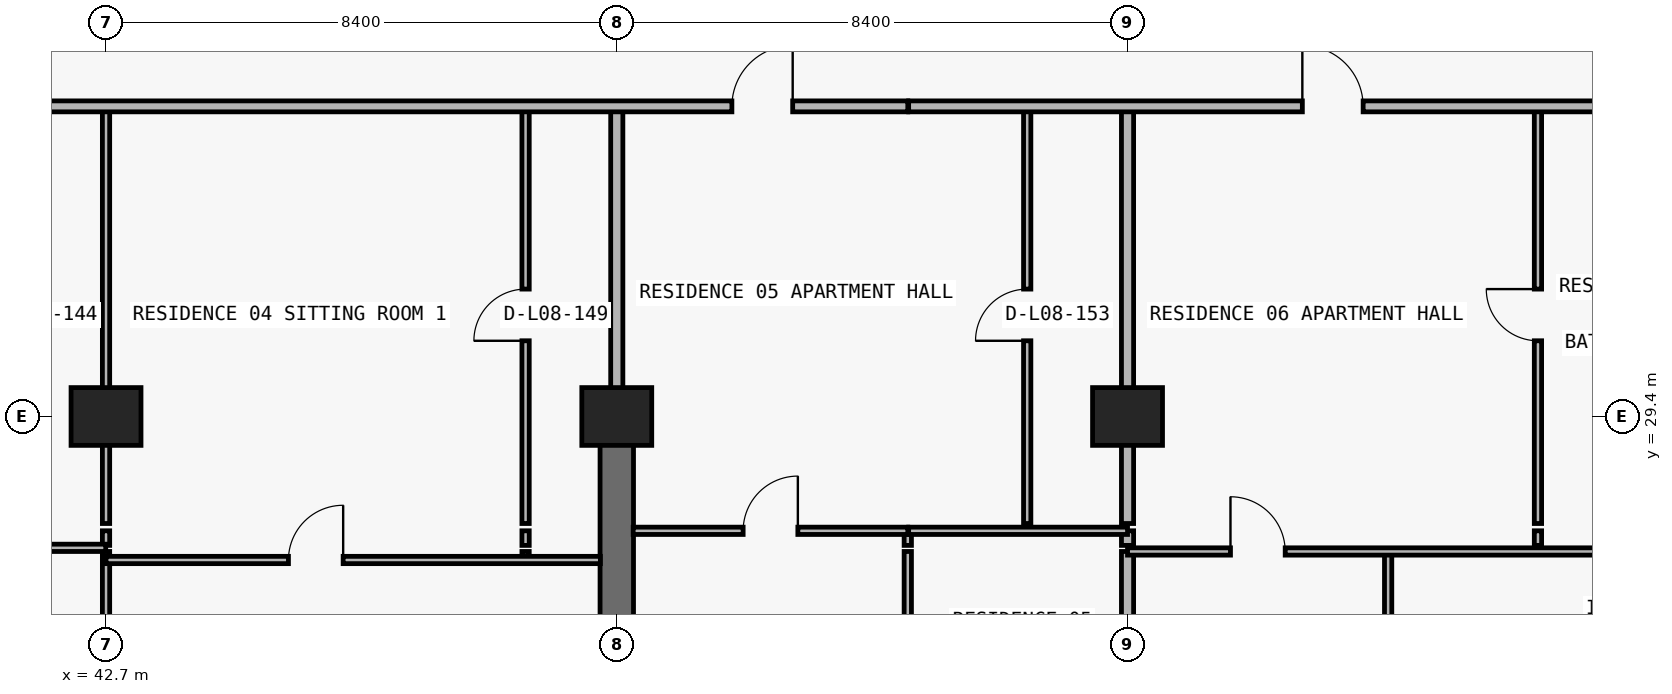
"""IFC4 building model, lengths in metres.
Left out: names, types, materials, properties, quantities, classifications, styles, units other than length and angle.
Written with IfcOpenShell. Run it as: python <this file> out.ifc"""

import sys

from ifc_helpers import new_model, si_unit, direction, frame, frame_2d, origin, origin_2d, place, context, subcontext, project, spatial, rectangle, extrude, element, fill, save


model = new_model("IFC4")
c1 = context("Model", 3, precision=1e-05, world=origin(), true_north=direction((0.0, 1.0)))
c2 = subcontext(c1, "Body", "Model", "MODEL_VIEW")
j1 = project(units=[si_unit("LENGTHUNIT", "METRE"), si_unit("PLANEANGLEUNIT", "RADIAN")], contexts=[c1])
p1 = place(None, origin())
s1 = spatial("IfcSite", under=j1, at=p1, CompositionType="ELEMENT")
p2 = place(p1, origin())
s2 = spatial("IfcBuilding", under=s1, at=p2, CompositionType="ELEMENT")
p3 = place(p2, frame((0.0, 0.0, 36.6)))
s3 = spatial("IfcBuildingStorey", under=s2, at=p3, CompositionType="ELEMENT", Elevation=36.6)
for number, where, z_axis, x_axis in (
    (1, (42.7, 29.4, 0.0), (0.0, 0.0, 1.0), (1.0, 0.0, 0.0)),
    (2, (51.1, 29.4, 0.0), (0.0, 0.0, 1.0), (1.0, 0.0, 0.0)),
    (3, (59.5, 29.4, 0.0), (0.0, 0.0, 1.0), (1.0, 0.0, 0.0)),
):
    element("IfcColumn", number, at=place(p3, frame(where, z_axis=z_axis, x_axis=x_axis)), inside=s3, PredefinedType="COLUMN", context=c2, shape_type="SweptSolid", body=[
        extrude(rectangle(XDim=1.15, YDim=0.95, at=origin_2d()), origin(), (0.0, 0.0, 1.0), 3.05),
    ])
p4 = place(p3, frame((51.1, 20.8, 0.0), z_axis=(0.0, 0.0, 1.0), x_axis=(0.0, 1.0, 0.0)))
e4 = element("IfcWall", 4, at=p4, inside=s3, PredefinedType="SHEAR", context=c2, shape_type="SweptSolid", body=[
    extrude(rectangle(XDim=8.6, YDim=0.55, at=frame_2d((4.3, 0.0))), origin(), (0.0, 0.0, 1.0), 3.05),
])
p5 = place(p3, frame((42.7, 22.49, 0.0), z_axis=(0.0, 0.0, 1.0), x_axis=(0.0, 1.0, 0.0)))
e5 = element("IfcWall", 5, at=p5, inside=s3, PredefinedType="PARTITIONING", context=c2, shape_type="SweptSolid", body=[
    extrude(rectangle(XDim=4.69, YDim=0.12, at=frame_2d((2.345, 0.0))), origin(), (0.0, 0.0, 1.0), 2.11),
])
p6 = place(p5, frame((1.9, 0.0, 0.0)))
e6 = element("IfcOpeningElement", 6, at=p6, cuts=e5, PredefinedType="OPENING", context=c2, shape_type="SweptSolid", body=[
    extrude(rectangle(XDim=0.9, YDim=2.06, at=frame_2d((0.45, 1.03))), frame((0.0, 0.07, 0.0), z_axis=(0.0, -1.0, 0.0), x_axis=(1.0, 0.0, 0.0)), (0.0, 0.0, 1.0), 0.14),
])
p7 = place(p3, frame((42.7, 27.28, 0.0), z_axis=(0.0, 0.0, 1.0), x_axis=(0.0, 1.0, 0.0)))
e7 = element("IfcWall", 7, at=p7, inside=s3, PredefinedType="PARTITIONING", context=c2, shape_type="SweptSolid", body=[
    extrude(rectangle(XDim=0.24, YDim=0.12, at=frame_2d((0.12, 0.0))), origin(), (0.0, 0.0, 1.0), 2.11),
])
p8 = place(p3, frame((42.7, 27.64, 0.0), z_axis=(0.0, 0.0, 1.0), x_axis=(0.0, 1.0, 0.0)))
e8 = element("IfcWall", 8, at=p8, inside=s3, PredefinedType="PARTITIONING", context=c2, shape_type="SweptSolid", body=[
    extrude(rectangle(XDim=6.86, YDim=0.12, at=frame_2d((3.43, 0.0))), origin(), (0.0, 0.0, 1.0), 2.11),
])
p9 = place(p3, frame((49.6, 27.04, 0.0), z_axis=(0.0, 0.0, 1.0), x_axis=(0.0, 1.0, 0.0)))
e9 = element("IfcWall", 9, at=p9, inside=s3, PredefinedType="PARTITIONING", context=c2, shape_type="SweptSolid", body=[
    extrude(rectangle(XDim=0.14, YDim=0.12, at=frame_2d((0.07, 0.0))), origin(), (0.0, 0.0, 1.0), 3.05),
])
p10 = place(p3, frame((49.6, 27.28, 0.0), z_axis=(0.0, 0.0, 1.0), x_axis=(0.0, 1.0, 0.0)))
e10 = element("IfcWall", 10, at=p10, inside=s3, PredefinedType="PARTITIONING", context=c2, shape_type="SweptSolid", body=[
    extrude(rectangle(XDim=0.24, YDim=0.12, at=frame_2d((0.12, 0.0))), origin(), (0.0, 0.0, 1.0), 3.05),
])
p11 = place(p3, frame((49.6, 27.64, 0.0), z_axis=(0.0, 0.0, 1.0), x_axis=(0.0, 1.0, 0.0)))
e11 = element("IfcWall", 11, at=p11, inside=s3, PredefinedType="PARTITIONING", context=c2, shape_type="SweptSolid", body=[
    extrude(rectangle(XDim=6.86, YDim=0.12, at=frame_2d((3.43, 0.0))), origin(), (0.0, 0.0, 1.0), 3.05),
])
p12 = place(p11, frame((3.005, 0.0, 0.0)))
e12 = element("IfcOpeningElement", 12, at=p12, cuts=e11, PredefinedType="OPENING", context=c2, shape_type="SweptSolid", body=[
    extrude(rectangle(XDim=0.85, YDim=2.1, at=frame_2d((0.425, 1.05))), frame((0.0, 0.07, 0.0), z_axis=(0.0, -1.0, 0.0), x_axis=(1.0, 0.0, 0.0)), (0.0, 0.0, 1.0), 0.14),
])
p13 = place(p3, frame((51.1, 29.405, 0.0), z_axis=(0.0, 0.0, 1.0), x_axis=(0.0, 1.0, 0.0)))
e13 = element("IfcWall", 13, at=p13, inside=s3, PredefinedType="PARTITIONING", context=c2, shape_type="SweptSolid", body=[
    extrude(rectangle(XDim=5.095, YDim=0.2, at=frame_2d((2.547, 0.0))), origin(), (0.0, 0.0, 1.0), 2.335),
])
p14 = place(p3, frame((55.886, 22.49, 0.0), z_axis=(0.0, 0.0, 1.0), x_axis=(0.0, 1.0, 0.0)))
e14 = element("IfcWall", 14, at=p14, inside=s3, PredefinedType="PARTITIONING", context=c2, shape_type="SweptSolid", body=[
    extrude(rectangle(XDim=4.69, YDim=0.12, at=frame_2d((2.345, 0.0))), origin(), (0.0, 0.0, 1.0), 3.05),
])
p15 = place(p14, frame((1.895, 0.0, 0.0)))
e15 = element("IfcOpeningElement", 15, at=p15, cuts=e14, PredefinedType="OPENING", context=c2, shape_type="SweptSolid", body=[
    extrude(rectangle(XDim=0.9, YDim=2.15, at=frame_2d((0.45, 1.075))), frame((0.0, 0.07, 0.0), z_axis=(0.0, -1.0, 0.0), x_axis=(1.0, 0.0, 0.0)), (0.0, 0.0, 1.0), 0.14),
])
p16 = place(p3, frame((55.886, 27.28, 0.0), z_axis=(0.0, 0.0, 1.0), x_axis=(0.0, 1.0, 0.0)))
e16 = element("IfcWall", 16, at=p16, inside=s3, PredefinedType="PARTITIONING", context=c2, shape_type="SweptSolid", body=[
    extrude(rectangle(XDim=0.24, YDim=0.12, at=frame_2d((0.12, 0.0))), origin(), (0.0, 0.0, 1.0), 3.05),
])
p17 = place(p3, frame((57.85, 27.64, 0.0), z_axis=(0.0, 0.0, 1.0), x_axis=(0.0, 1.0, 0.0)))
e17 = element("IfcWall", 17, at=p17, inside=s3, PredefinedType="PARTITIONING", context=c2, shape_type="SweptSolid", body=[
    extrude(rectangle(XDim=6.86, YDim=0.12, at=frame_2d((3.43, 0.0))), origin(), (0.0, 0.0, 1.0), 3.05),
])
p18 = place(p17, frame((3.005, 0.0, 0.0)))
e18 = element("IfcOpeningElement", 18, at=p18, cuts=e17, PredefinedType="OPENING", context=c2, shape_type="SweptSolid", body=[
    extrude(rectangle(XDim=0.85, YDim=2.1, at=frame_2d((0.425, 1.05))), frame((0.0, 0.07, 0.0), z_axis=(0.0, -1.0, 0.0), x_axis=(1.0, 0.0, 0.0)), (0.0, 0.0, 1.0), 0.14),
])
p19 = place(p3, frame((59.5, 22.49, 0.0), z_axis=(0.0, 0.0, 1.0), x_axis=(0.0, 1.0, 0.0)))
e19 = element("IfcWall", 19, at=p19, inside=s3, PredefinedType="PARTITIONING", context=c2, shape_type="SweptSolid", body=[
    extrude(rectangle(XDim=4.69, YDim=0.2, at=frame_2d((2.345, 0.0))), origin(), (0.0, 0.0, 1.0), 2.11),
])
p20 = place(p3, frame((59.5, 27.28, 0.0), z_axis=(0.0, 0.0, 1.0), x_axis=(0.0, 1.0, 0.0)))
e20 = element("IfcWall", 20, at=p20, inside=s3, PredefinedType="PARTITIONING", context=c2, shape_type="SweptSolid", body=[
    extrude(rectangle(XDim=0.24, YDim=0.2, at=frame_2d((0.12, 0.0))), origin(), (0.0, 0.0, 1.0), 2.11),
])
p21 = place(p3, frame((59.5, 27.64, 0.0), z_axis=(0.0, 0.0, 1.0), x_axis=(0.0, 1.0, 0.0)))
e21 = element("IfcWall", 21, at=p21, inside=s3, PredefinedType="PARTITIONING", context=c2, shape_type="SweptSolid", body=[
    extrude(rectangle(XDim=6.86, YDim=0.2, at=frame_2d((3.43, 0.0))), origin(), (0.0, 0.0, 1.0), 2.11),
])
p22 = place(p3, frame((63.786, 22.49, 0.0), z_axis=(0.0, 0.0, 1.0), x_axis=(0.0, 1.0, 0.0)))
e22 = element("IfcWall", 22, at=p22, inside=s3, PredefinedType="PARTITIONING", context=c2, shape_type="SweptSolid", body=[
    extrude(rectangle(XDim=4.69, YDim=0.12, at=frame_2d((2.345, 0.0))), origin(), (0.0, 0.0, 1.0), 3.05),
])
p23 = place(p22, frame((1.895, 0.0, 0.0)))
e23 = element("IfcOpeningElement", 23, at=p23, cuts=e22, PredefinedType="OPENING", context=c2, shape_type="SweptSolid", body=[
    extrude(rectangle(XDim=0.9, YDim=2.15, at=frame_2d((0.45, 1.075))), frame((0.0, 0.07, 0.0), z_axis=(0.0, -1.0, 0.0), x_axis=(1.0, 0.0, 0.0)), (0.0, 0.0, 1.0), 0.14),
])
p24 = place(p3, frame((66.25, 27.28, 0.0), z_axis=(0.0, 0.0, 1.0), x_axis=(0.0, 1.0, 0.0)))
e24 = element("IfcWall", 24, at=p24, inside=s3, PredefinedType="PARTITIONING", context=c2, shape_type="SweptSolid", body=[
    extrude(rectangle(XDim=0.24, YDim=0.12, at=frame_2d((0.12, 0.0))), origin(), (0.0, 0.0, 1.0), 3.05),
])
p25 = place(p3, frame((66.25, 27.64, 0.0), z_axis=(0.0, 0.0, 1.0), x_axis=(0.0, 1.0, 0.0)))
e25 = element("IfcWall", 25, at=p25, inside=s3, PredefinedType="PARTITIONING", context=c2, shape_type="SweptSolid", body=[
    extrude(rectangle(XDim=6.86, YDim=0.12, at=frame_2d((3.43, 0.0))), origin(), (0.0, 0.0, 1.0), 3.05),
])
p26 = place(p25, frame((3.005, 0.0, 0.0)))
e26 = element("IfcOpeningElement", 26, at=p26, cuts=e25, PredefinedType="OPENING", context=c2, shape_type="SweptSolid", body=[
    extrude(rectangle(XDim=0.85, YDim=2.1, at=frame_2d((0.425, 1.05))), frame((0.0, 0.07, 0.0), z_axis=(0.0, -1.0, 0.0), x_axis=(1.0, 0.0, 0.0)), (0.0, 0.0, 1.0), 0.14),
])
p27 = place(p3, frame((42.7, 27.04, 0.0), z_axis=(0.0, 0.0, 1.0), x_axis=(1.0, 0.0, 0.0)))
e27 = element("IfcWall", 27, at=p27, inside=s3, PredefinedType="PARTITIONING", context=c2, shape_type="SweptSolid", body=[
    extrude(rectangle(XDim=8.13, YDim=0.12, at=frame_2d((4.065, 0.0))), origin(), (0.0, 0.0, 1.0), 3.05),
])
p28 = place(p27, frame((3.0, 0.0, 0.0)))
e28 = element("IfcOpeningElement", 28, at=p28, cuts=e27, PredefinedType="OPENING", context=c2, shape_type="SweptSolid", body=[
    extrude(rectangle(XDim=0.9, YDim=2.15, at=frame_2d((0.45, 1.075))), frame((0.0, 0.07, 0.0), z_axis=(0.0, -1.0, 0.0), x_axis=(1.0, 0.0, 0.0)), (0.0, 0.0, 1.0), 0.14),
])
p29 = place(p3, frame((59.5, 27.18, 0.0), z_axis=(0.0, 0.0, 1.0), x_axis=(1.0, 0.0, 0.0)))
e29 = element("IfcWall", 29, at=p29, inside=s3, PredefinedType="PARTITIONING", context=c2, shape_type="SweptSolid", body=[
    extrude(rectangle(XDim=8.4, YDim=0.12, at=frame_2d((4.2, 0.0))), origin(), (0.0, 0.0, 1.0), 3.05),
])
p30 = place(p29, frame((1.693, 0.0, 0.0)))
e30 = element("IfcOpeningElement", 30, at=p30, cuts=e29, PredefinedType="OPENING", context=c2, shape_type="SweptSolid", body=[
    extrude(rectangle(XDim=0.9, YDim=2.15, at=frame_2d((0.45, 1.075))), frame((0.0, 0.07, 0.0), z_axis=(0.0, -1.0, 0.0), x_axis=(1.0, 0.0, 0.0)), (0.0, 0.0, 1.0), 0.14),
])
p31 = place(p3, frame((35.1, 27.24, 0.0), z_axis=(0.0, 0.0, 1.0), x_axis=(1.0, 0.0, 0.0)))
e31 = element("IfcWall", 31, at=p31, inside=s3, PredefinedType="PARTITIONING", context=c2, shape_type="SweptSolid", body=[
    extrude(rectangle(XDim=7.595, YDim=0.12, at=frame_2d((3.797, 0.0))), origin(), (0.0, 0.0, 1.0), 3.05),
])
p32 = place(p31, frame((2.6, 0.0, 0.0)))
e32 = element("IfcOpeningElement", 32, at=p32, cuts=e31, PredefinedType="OPENING", context=c2, shape_type="SweptSolid", body=[
    extrude(rectangle(XDim=0.9, YDim=2.15, at=frame_2d((0.45, 1.075))), frame((0.0, 0.07, 0.0), z_axis=(0.0, -1.0, 0.0), x_axis=(1.0, 0.0, 0.0)), (0.0, 0.0, 1.0), 0.14),
])
p33 = place(p3, frame((51.37, 27.52, 0.0), z_axis=(0.0, 0.0, 1.0), x_axis=(1.0, 0.0, 0.0)))
e33 = element("IfcWall", 33, at=p33, inside=s3, PredefinedType="PARTITIONING", context=c2, shape_type="SweptSolid", body=[
    extrude(rectangle(XDim=4.516, YDim=0.12, at=frame_2d((2.258, 0.0))), origin(), (0.0, 0.0, 1.0), 3.05),
])
p34 = place(p33, frame((1.808, 0.0, 0.0)))
e34 = element("IfcOpeningElement", 34, at=p34, cuts=e33, PredefinedType="OPENING", context=c2, shape_type="SweptSolid", body=[
    extrude(rectangle(XDim=0.9, YDim=2.15, at=frame_2d((0.45, 1.075))), frame((0.0, 0.07, 0.0), z_axis=(0.0, -1.0, 0.0), x_axis=(1.0, 0.0, 0.0)), (0.0, 0.0, 1.0), 0.14),
])
p35 = place(p3, frame((55.9, 27.52, 0.0), z_axis=(0.0, 0.0, 1.0), x_axis=(1.0, 0.0, 0.0)))
e35 = element("IfcWall", 35, at=p35, inside=s3, PredefinedType="PARTITIONING", context=c2, shape_type="SweptSolid", body=[
    extrude(rectangle(XDim=3.6, YDim=0.12, at=frame_2d((1.8, 0.0))), origin(), (0.0, 0.0, 1.0), 3.05),
])
p36 = place(p3, frame((5.105, 34.5, 0.0), z_axis=(0.0, 0.0, 1.0), x_axis=(1.0, 0.0, 0.0)))
e36 = element("IfcWall", 36, at=p36, inside=s3, PredefinedType="PARTITIONING", context=c2, shape_type="SweptSolid", body=[
    extrude(rectangle(XDim=50.781, YDim=0.18, at=frame_2d((25.391, 0.0))), origin(), (0.0, 0.0, 1.0), 3.05),
])
p37 = place(p36, frame((7.67, 0.0, 0.0)))
e37 = element("IfcOpeningElement", 37, at=p37, cuts=e36, PredefinedType="OPENING", context=c2, shape_type="SweptSolid", body=[
    extrude(rectangle(XDim=1.0, YDim=2.2, at=frame_2d((0.5, 1.1))), frame((0.0, 0.1, 0.0), z_axis=(0.0, -1.0, 0.0), x_axis=(1.0, 0.0, 0.0)), (0.0, 0.0, 1.0), 0.2),
])
p38 = place(p36, frame((16.07, 0.0, 0.0)))
e38 = element("IfcOpeningElement", 38, at=p38, cuts=e36, PredefinedType="OPENING", context=c2, shape_type="SweptSolid", body=[
    extrude(rectangle(XDim=1.0, YDim=2.2, at=frame_2d((0.5, 1.1))), frame((0.0, 0.1, 0.0), z_axis=(0.0, -1.0, 0.0), x_axis=(1.0, 0.0, 0.0)), (0.0, 0.0, 1.0), 0.2),
])
p39 = place(p36, frame((24.47, 0.0, 0.0)))
e39 = element("IfcOpeningElement", 39, at=p39, cuts=e36, PredefinedType="OPENING", context=c2, shape_type="SweptSolid", body=[
    extrude(rectangle(XDim=1.0, YDim=2.2, at=frame_2d((0.5, 1.1))), frame((0.0, 0.1, 0.0), z_axis=(0.0, -1.0, 0.0), x_axis=(1.0, 0.0, 0.0)), (0.0, 0.0, 1.0), 0.2),
])
p40 = place(p36, frame((32.545, 0.0, 0.0)))
e40 = element("IfcOpeningElement", 40, at=p40, cuts=e36, PredefinedType="OPENING", context=c2, shape_type="SweptSolid", body=[
    extrude(rectangle(XDim=1.0, YDim=2.2, at=frame_2d((0.5, 1.1))), frame((0.0, 0.1, 0.0), z_axis=(0.0, -1.0, 0.0), x_axis=(1.0, 0.0, 0.0)), (0.0, 0.0, 1.0), 0.2),
])
p41 = place(p36, frame((47.888, 0.0, 0.0)))
e41 = element("IfcOpeningElement", 41, at=p41, cuts=e36, PredefinedType="OPENING", context=c2, shape_type="SweptSolid", body=[
    extrude(rectangle(XDim=1.0, YDim=2.2, at=frame_2d((0.5, 1.1))), frame((0.0, 0.1, 0.0), z_axis=(0.0, -1.0, 0.0), x_axis=(1.0, 0.0, 0.0)), (0.0, 0.0, 1.0), 0.2),
])
p42 = place(p3, frame((55.9, 34.5, 0.0), z_axis=(0.0, 0.0, 1.0), x_axis=(1.0, 0.0, 0.0)))
e42 = element("IfcWall", 42, at=p42, inside=s3, PredefinedType="PARTITIONING", context=c2, shape_type="SweptSolid", body=[
    extrude(rectangle(XDim=16.8, YDim=0.18, at=frame_2d((8.4, 0.0))), origin(), (0.0, 0.0, 1.0), 3.05),
])
p43 = place(p42, frame((6.475, 0.0, 0.0)))
e43 = element("IfcOpeningElement", 43, at=p43, cuts=e42, PredefinedType="OPENING", context=c2, shape_type="SweptSolid", body=[
    extrude(rectangle(XDim=1.0, YDim=2.2, at=frame_2d((0.5, 1.1))), frame((0.0, 0.1, 0.0), z_axis=(0.0, -1.0, 0.0), x_axis=(1.0, 0.0, 0.0)), (0.0, 0.0, 1.0), 0.2),
])
p44 = place(p28, origin())
e44 = element("IfcDoor", 44, at=p44, inside=s3, OperationType="SINGLE_SWING_RIGHT", PredefinedType="DOOR", context=c2, shape_type="SweptSolid", body=[
    extrude(rectangle(XDim=0.9, YDim=2.15, at=frame_2d((0.45, 1.075))), frame((0.0, 0.025, 0.0), z_axis=(0.0, -1.0, 0.0), x_axis=(1.0, 0.0, 0.0)), (0.0, 0.0, 1.0), 0.05),
])
fill(e28, e44)
p45 = place(p12, origin())
e45 = element("IfcDoor", 45, at=p45, inside=s3, OperationType="SINGLE_SWING_LEFT", PredefinedType="DOOR", context=c2, shape_type="SweptSolid", body=[
    extrude(rectangle(XDim=0.85, YDim=2.1, at=frame_2d((0.425, 1.05))), frame((0.0, 0.025, 0.0), z_axis=(0.0, -1.0, 0.0), x_axis=(1.0, 0.0, 0.0)), (0.0, 0.0, 1.0), 0.05),
])
fill(e12, e45)
p46 = place(p41, origin())
e46 = element("IfcDoor", 46, at=p46, inside=s3, OperationType="SINGLE_SWING_RIGHT", PredefinedType="DOOR", context=c2, shape_type="SweptSolid", body=[
    extrude(rectangle(XDim=1.0, YDim=2.2, at=frame_2d((0.5, 1.1))), frame((0.0, 0.025, 0.0), z_axis=(0.0, -1.0, 0.0), x_axis=(1.0, 0.0, 0.0)), (0.0, 0.0, 1.0), 0.05),
])
fill(e41, e46)
p47 = place(p18, origin())
e47 = element("IfcDoor", 47, at=p47, inside=s3, OperationType="SINGLE_SWING_LEFT", PredefinedType="DOOR", context=c2, shape_type="SweptSolid", body=[
    extrude(rectangle(XDim=0.85, YDim=2.1, at=frame_2d((0.425, 1.05))), frame((0.0, 0.025, 0.0), z_axis=(0.0, -1.0, 0.0), x_axis=(1.0, 0.0, 0.0)), (0.0, 0.0, 1.0), 0.05),
])
fill(e18, e47)
p48 = place(p34, origin())
e48 = element("IfcDoor", 48, at=p48, inside=s3, OperationType="SINGLE_SWING_RIGHT", PredefinedType="DOOR", context=c2, shape_type="SweptSolid", body=[
    extrude(rectangle(XDim=0.9, YDim=2.15, at=frame_2d((0.45, 1.075))), frame((0.0, 0.025, 0.0), z_axis=(0.0, -1.0, 0.0), x_axis=(1.0, 0.0, 0.0)), (0.0, 0.0, 1.0), 0.05),
])
fill(e34, e48)
p49 = place(p43, origin())
e49 = element("IfcDoor", 49, at=p49, inside=s3, OperationType="SINGLE_SWING_LEFT", PredefinedType="DOOR", context=c2, shape_type="SweptSolid", body=[
    extrude(rectangle(XDim=1.0, YDim=2.2, at=frame_2d((0.5, 1.1))), frame((0.0, 0.025, 0.0), z_axis=(0.0, -1.0, 0.0), x_axis=(1.0, 0.0, 0.0)), (0.0, 0.0, 1.0), 0.05),
])
fill(e43, e49)
p50 = place(p26, origin())
e50 = element("IfcDoor", 50, at=p50, inside=s3, OperationType="SINGLE_SWING_RIGHT", PredefinedType="DOOR", context=c2, shape_type="SweptSolid", body=[
    extrude(rectangle(XDim=0.85, YDim=2.1, at=frame_2d((0.425, 1.05))), frame((0.0, 0.025, 0.0), z_axis=(0.0, -1.0, 0.0), x_axis=(1.0, 0.0, 0.0)), (0.0, 0.0, 1.0), 0.05),
])
fill(e26, e50)
p51 = place(p30, origin())
e51 = element("IfcDoor", 51, at=p51, inside=s3, OperationType="SINGLE_SWING_LEFT", PredefinedType="DOOR", context=c2, shape_type="SweptSolid", body=[
    extrude(rectangle(XDim=0.9, YDim=2.15, at=frame_2d((0.45, 1.075))), frame((0.0, 0.025, 0.0), z_axis=(0.0, -1.0, 0.0), x_axis=(1.0, 0.0, 0.0)), (0.0, 0.0, 1.0), 0.05),
])
fill(e30, e51)
save(model, sys.argv[1])
